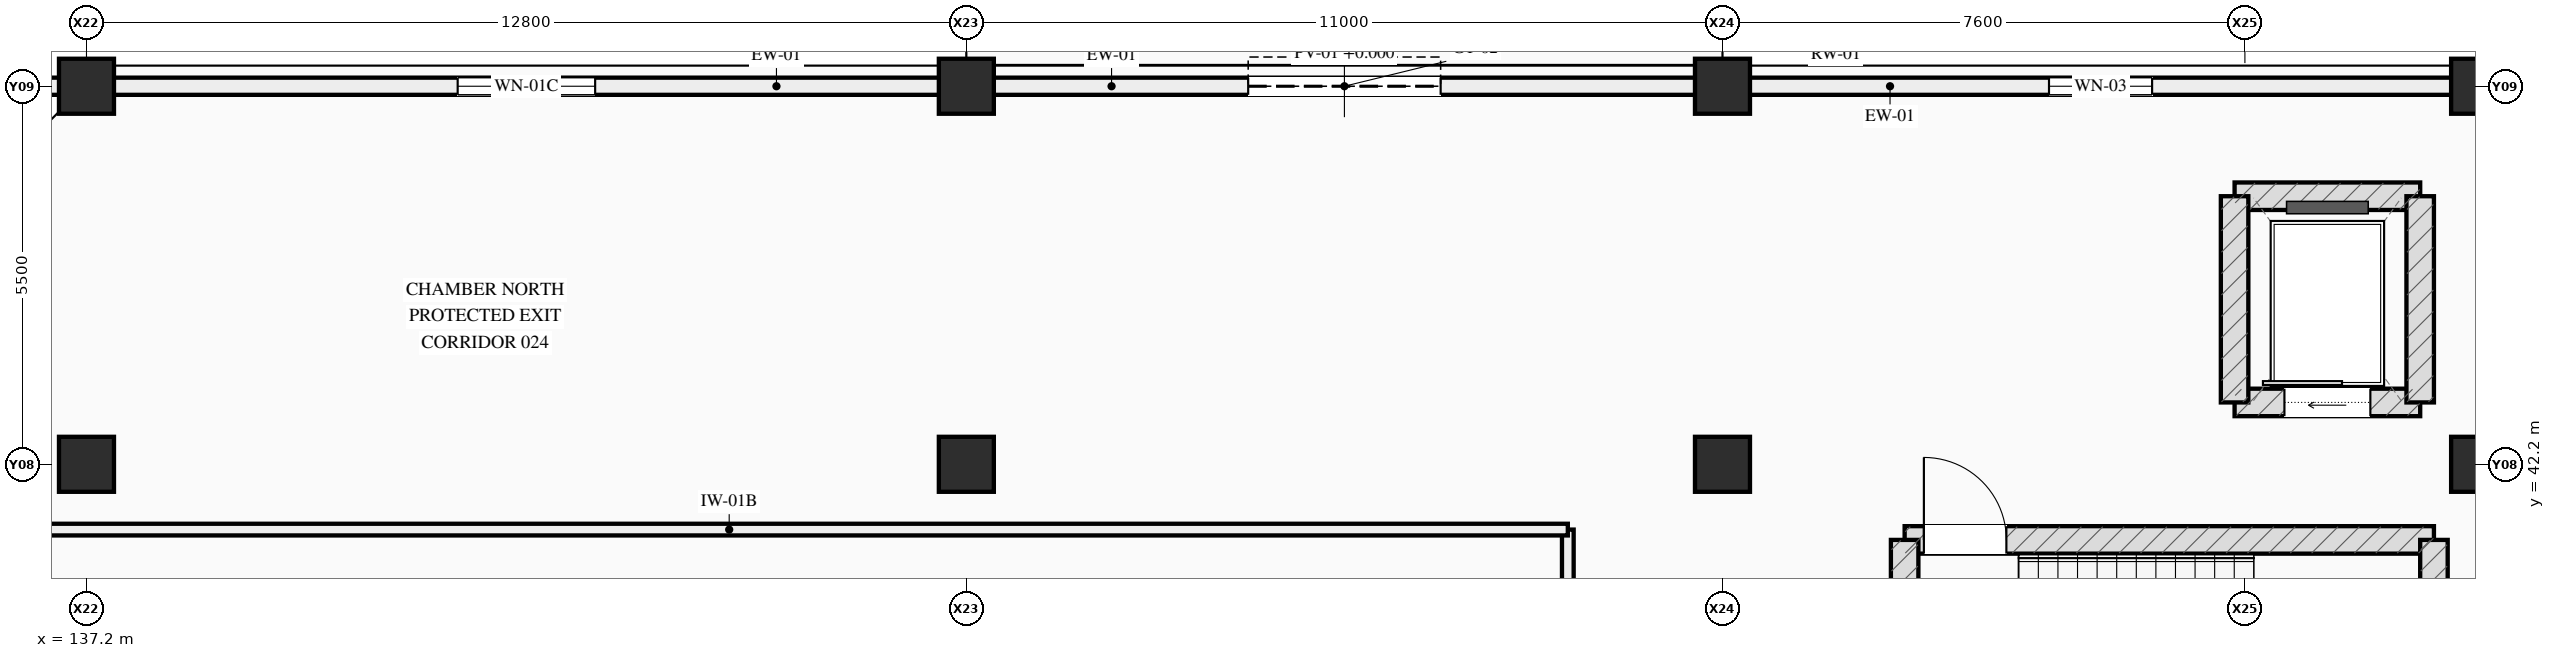
"""IFC4 building model, lengths in metres.
Left out: names, types, materials, properties, quantities, classifications, styles, units other than length and angle.
Written with IfcOpenShell. Run it as: python <this file> out.ifc"""

import sys

from ifc_helpers import new_model, si_unit, direction, frame, frame_2d, origin, origin_2d, place, context, subcontext, project, spatial, rectangle, extrude, element, fill, save


model = new_model("IFC4")
c1 = context("Model", 3, precision=1e-05, world=origin(), true_north=direction((0.0, 1.0)))
c2 = subcontext(c1, "Body", "Model", "MODEL_VIEW")
j1 = project(units=[si_unit("LENGTHUNIT", "METRE"), si_unit("PLANEANGLEUNIT", "RADIAN")], contexts=[c1])
p1 = place(None, origin())
s1 = spatial("IfcSite", under=j1, at=p1, CompositionType="ELEMENT")
p2 = place(p1, origin())
s2 = spatial("IfcBuilding", under=s1, at=p2, CompositionType="ELEMENT")
p3 = place(p2, origin())
s3 = spatial("IfcBuildingStorey", under=s2, at=p3, CompositionType="ELEMENT", Elevation=0.0)
for number, where, z_axis, x_axis in (
    (1, (137.2, 42.2, 0.0), (0.0, 0.0, 1.0), (1.0, 0.0, 0.0)),
    (2, (137.2, 47.7, 0.0), (0.0, 0.0, 1.0), (1.0, 0.0, 0.0)),
    (3, (150.0, 42.2, 0.0), (0.0, 0.0, 1.0), (1.0, 0.0, 0.0)),
    (4, (150.0, 47.7, 0.0), (0.0, 0.0, 1.0), (1.0, 0.0, 0.0)),
    (5, (161.0, 42.2, 0.0), (0.0, 0.0, 1.0), (1.0, 0.0, 0.0)),
    (6, (161.0, 47.7, 0.0), (0.0, 0.0, 1.0), (1.0, 0.0, 0.0)),
    (7, (172.0, 42.2, 0.0), (0.0, 0.0, 1.0), (1.0, 0.0, 0.0)),
    (8, (172.0, 47.7, 0.0), (0.0, 0.0, 1.0), (1.0, 0.0, 0.0)),
):
    element("IfcColumn", number, at=place(p3, frame(where, z_axis=z_axis, x_axis=x_axis)), inside=s3, PredefinedType="COLUMN", context=c2, shape_type="SweptSolid", body=[
        extrude(rectangle(XDim=0.8, YDim=0.8, at=origin_2d()), origin(), (0.0, 0.0, 1.0), 4.5),
    ])
p4 = place(p3, frame((134.275, 47.7, 0.0), z_axis=(0.0, 0.0, 1.0), x_axis=(1.0, 0.0, 0.0)))
e9 = element("IfcWall", 9, at=p4, inside=s3, PredefinedType="STANDARD", context=c2, shape_type="SweptSolid", body=[
    extrude(rectangle(XDim=2.55, YDim=0.25, at=frame_2d((1.275, 0.0))), origin(), (0.0, 0.0, 1.0), 3.545),
])
p5 = place(p3, frame((137.575, 47.7, 0.0), z_axis=(0.0, 0.0, 1.0), x_axis=(1.0, 0.0, 0.0)))
e10 = element("IfcWall", 10, at=p5, inside=s3, PredefinedType="STANDARD", context=c2, shape_type="SweptSolid", body=[
    extrude(rectangle(XDim=12.05, YDim=0.25, at=frame_2d((6.025, 0.0))), origin(), (0.0, 0.0, 1.0), 3.545),
])
p6 = place(p5, frame((5.025, 0.0, 0.92)))
e11 = element("IfcOpeningElement", 11, at=p6, cuts=e10, PredefinedType="OPENING", context=c2, shape_type="SweptSolid", body=[
    extrude(rectangle(XDim=2.0, YDim=1.5, at=frame_2d((1.0, 0.75))), frame((0.0, 0.135, 0.0), z_axis=(0.0, -1.0, 0.0), x_axis=(1.0, 0.0, 0.0)), (0.0, 0.0, 1.0), 0.27),
])
p7 = place(p3, frame((150.375, 47.7, 0.0), z_axis=(0.0, 0.0, 1.0), x_axis=(1.0, 0.0, 0.0)))
e12 = element("IfcWall", 12, at=p7, inside=s3, PredefinedType="STANDARD", context=c2, shape_type="SweptSolid", body=[
    extrude(rectangle(XDim=10.25, YDim=0.25, at=frame_2d((5.125, 0.0))), origin(), (0.0, 0.0, 1.0), 3.545),
])
p8 = place(p7, frame((3.725, 0.0, 0.0)))
e13 = element("IfcOpeningElement", 13, at=p8, cuts=e12, PredefinedType="OPENING", context=c2, shape_type="SweptSolid", body=[
    extrude(rectangle(XDim=2.8, YDim=2.85, at=frame_2d((1.4, 1.425))), frame((0.0, 0.135, 0.0), z_axis=(0.0, -1.0, 0.0), x_axis=(1.0, 0.0, 0.0)), (0.0, 0.0, 1.0), 0.27),
])
p9 = place(p3, frame((161.375, 47.7, 0.0), z_axis=(0.0, 0.0, 1.0), x_axis=(1.0, 0.0, 0.0)))
e14 = element("IfcWall", 14, at=p9, inside=s3, PredefinedType="STANDARD", context=c2, shape_type="SweptSolid", body=[
    extrude(rectangle(XDim=10.25, YDim=0.25, at=frame_2d((5.125, 0.0))), origin(), (0.0, 0.0, 1.0), 3.545),
])
p10 = place(p9, frame((4.375, 0.0, 0.95)))
e15 = element("IfcOpeningElement", 15, at=p10, cuts=e14, PredefinedType="OPENING", context=c2, shape_type="SweptSolid", body=[
    extrude(rectangle(XDim=1.5, YDim=1.45, at=frame_2d((0.75, 0.725))), frame((0.0, 0.135, 0.0), z_axis=(0.0, -1.0, 0.0), x_axis=(1.0, 0.0, 0.0)), (0.0, 0.0, 1.0), 0.27),
])
p11 = place(p3, frame((163.65, 41.1, 0.0), z_axis=(0.0, 0.0, 1.0), x_axis=(1.0, 0.0, 0.0)))
e16 = element("IfcWall", 16, at=p11, inside=s3, PredefinedType="SHEAR", context=c2, shape_type="SweptSolid", body=[
    extrude(rectangle(XDim=7.7, YDim=0.4, at=frame_2d((3.85, 0.0))), origin(), (0.0, 0.0, 1.0), 4.215),
])
p12 = place(p11, frame((0.28, 0.0, 0.0)))
e17 = element("IfcOpeningElement", 17, at=p12, cuts=e16, PredefinedType="OPENING", context=c2, shape_type="SweptSolid", body=[
    extrude(rectangle(XDim=1.2, YDim=2.2, at=frame_2d((0.6, 1.1))), frame((0.0, 0.21, 0.0), z_axis=(0.0, -1.0, 0.0), x_axis=(1.0, 0.0, 0.0)), (0.0, 0.0, 1.0), 0.42),
])
for number, where, z_axis, x_axis in (
    (18, (163.65, 37.45, 0.0), (0.0, 0.0, 1.0), (0.0, 1.0, 0.0)),
    (19, (171.35, 41.1, 0.0), (0.0, 0.0, 1.0), (0.0, -1.0, 0.0)),
):
    element("IfcWall", number, at=place(p3, frame(where, z_axis=z_axis, x_axis=x_axis)), inside=s3, PredefinedType="SHEAR", context=c2, shape_type="SweptSolid", body=[
        extrude(rectangle(XDim=3.65, YDim=0.4, at=frame_2d((1.825, 0.0))), origin(), (0.0, 0.0, 1.0), 4.215),
    ])
p13 = place(p3, frame((168.45, 43.1, 0.0), z_axis=(0.0, 0.0, 1.0), x_axis=(1.0, 0.0, 0.0)))
e20 = element("IfcWall", 20, at=p13, inside=s3, PredefinedType="SHEAR", context=c2, shape_type="SweptSolid", body=[
    extrude(rectangle(XDim=2.7, YDim=0.4, at=frame_2d((1.35, 0.0))), origin(), (0.0, 0.0, 1.0), 4.215),
])
p14 = place(p13, frame((0.725, 0.0, 0.0)))
e21 = element("IfcOpeningElement", 21, at=p14, cuts=e20, PredefinedType="OPENING", context=c2, shape_type="SweptSolid", body=[
    extrude(rectangle(XDim=1.25, YDim=2.2, at=frame_2d((0.625, 1.1))), frame((0.0, 0.21, 0.0), z_axis=(0.0, -1.0, 0.0), x_axis=(1.0, 0.0, 0.0)), (0.0, 0.0, 1.0), 0.42),
])
p15 = place(p3, frame((168.45, 46.1, 0.0), z_axis=(0.0, 0.0, 1.0), x_axis=(1.0, 0.0, 0.0)))
e22 = element("IfcWall", 22, at=p15, inside=s3, PredefinedType="SHEAR", context=c2, shape_type="SweptSolid", body=[
    extrude(rectangle(XDim=2.7, YDim=0.4, at=frame_2d((1.35, 0.0))), origin(), (0.0, 0.0, 1.0), 4.215),
])
for number, where, z_axis, x_axis in (
    (23, (168.45, 43.1, 0.0), (0.0, 0.0, 1.0), (0.0, 1.0, 0.0)),
    (24, (171.15, 43.1, 0.0), (0.0, 0.0, 1.0), (0.0, 1.0, 0.0)),
):
    element("IfcWall", number, at=place(p3, frame(where, z_axis=z_axis, x_axis=x_axis)), inside=s3, PredefinedType="SHEAR", context=c2, shape_type="SweptSolid", body=[
        extrude(rectangle(XDim=3.0, YDim=0.4, at=frame_2d((1.5, 0.0))), origin(), (0.0, 0.0, 1.0), 4.215),
    ])
p16 = place(p3, frame((158.75, 25.6, 0.0), z_axis=(0.0, 0.0, 1.0), x_axis=(0.0, 1.0, 0.0)))
e25 = element("IfcWall", 25, at=p16, inside=s3, PredefinedType="SOLIDWALL", context=c2, shape_type="SweptSolid", body=[
    extrude(rectangle(XDim=15.65, YDim=0.17, at=frame_2d((7.825, 0.0))), origin(), (0.0, 0.0, 1.0), 3.3),
])
p17 = place(p16, frame((11.175, 0.0, 0.0)))
e26 = element("IfcOpeningElement", 26, at=p17, cuts=e25, PredefinedType="OPENING", context=c2, shape_type="SweptSolid", body=[
    extrude(rectangle(XDim=1.0, YDim=2.15, at=frame_2d((0.5, 1.075))), frame((0.0, 0.095, 0.0), z_axis=(0.0, -1.0, 0.0), x_axis=(1.0, 0.0, 0.0)), (0.0, 0.0, 1.0), 0.19),
])
p18 = place(p3, frame((134.35, 41.25, 0.0), z_axis=(0.0, 0.0, 1.0), x_axis=(1.0, 0.0, 0.0)))
e27 = element("IfcWall", 27, at=p18, inside=s3, PredefinedType="SOLIDWALL", context=c2, shape_type="SweptSolid", body=[
    extrude(rectangle(XDim=24.4, YDim=0.17, at=frame_2d((12.2, 0.0))), origin(), (0.0, 0.0, 1.0), 3.3),
])
p19 = place(p6, origin())
e28 = element("IfcWindow", 28, at=p19, inside=s3, PartitioningType="SINGLE_PANEL", PredefinedType="WINDOW", context=c2, shape_type="SweptSolid", body=[
    extrude(rectangle(XDim=2.0, YDim=1.5, at=frame_2d((1.0, 0.75))), frame((0.0, 0.03, 0.0), z_axis=(0.0, -1.0, 0.0), x_axis=(1.0, 0.0, 0.0)), (0.0, 0.0, 1.0), 0.06),
])
fill(e11, e28)
p20 = place(p8, origin())
e29 = element("IfcDoor", 29, at=p20, inside=s3, OperationType="ROLLINGUP", PredefinedType="GATE", context=c2, shape_type="SweptSolid", body=[
    extrude(rectangle(XDim=2.8, YDim=2.85, at=frame_2d((1.4, 1.425))), frame((0.0, 0.025, 0.0), z_axis=(0.0, -1.0, 0.0), x_axis=(1.0, 0.0, 0.0)), (0.0, 0.0, 1.0), 0.05),
])
fill(e13, e29)
p21 = place(p10, origin())
e30 = element("IfcWindow", 30, at=p21, inside=s3, PartitioningType="SINGLE_PANEL", PredefinedType="WINDOW", context=c2, shape_type="SweptSolid", body=[
    extrude(rectangle(XDim=1.5, YDim=1.45, at=frame_2d((0.75, 0.725))), frame((0.0, 0.03, 0.0), z_axis=(0.0, -1.0, 0.0), x_axis=(1.0, 0.0, 0.0)), (0.0, 0.0, 1.0), 0.06),
])
fill(e15, e30)
p22 = place(p12, origin())
e31 = element("IfcDoor", 31, at=p22, inside=s3, OperationType="SINGLE_SWING_LEFT", PredefinedType="DOOR", context=c2, shape_type="SweptSolid", body=[
    extrude(rectangle(XDim=1.2, YDim=2.2, at=frame_2d((0.6, 1.1))), frame((0.0, 0.025, 0.0), z_axis=(0.0, -1.0, 0.0), x_axis=(1.0, 0.0, 0.0)), (0.0, 0.0, 1.0), 0.05),
])
fill(e17, e31)
p23 = place(p14, origin())
e32 = element("IfcDoor", 32, at=p23, inside=s3, OperationType="SLIDING_TO_LEFT", PredefinedType="DOOR", context=c2, shape_type="SweptSolid", body=[
    extrude(rectangle(XDim=1.25, YDim=2.2, at=frame_2d((0.625, 1.1))), frame((0.0, 0.025, 0.0), z_axis=(0.0, -1.0, 0.0), x_axis=(1.0, 0.0, 0.0)), (0.0, 0.0, 1.0), 0.05),
])
fill(e21, e32)
save(model, sys.argv[1])
